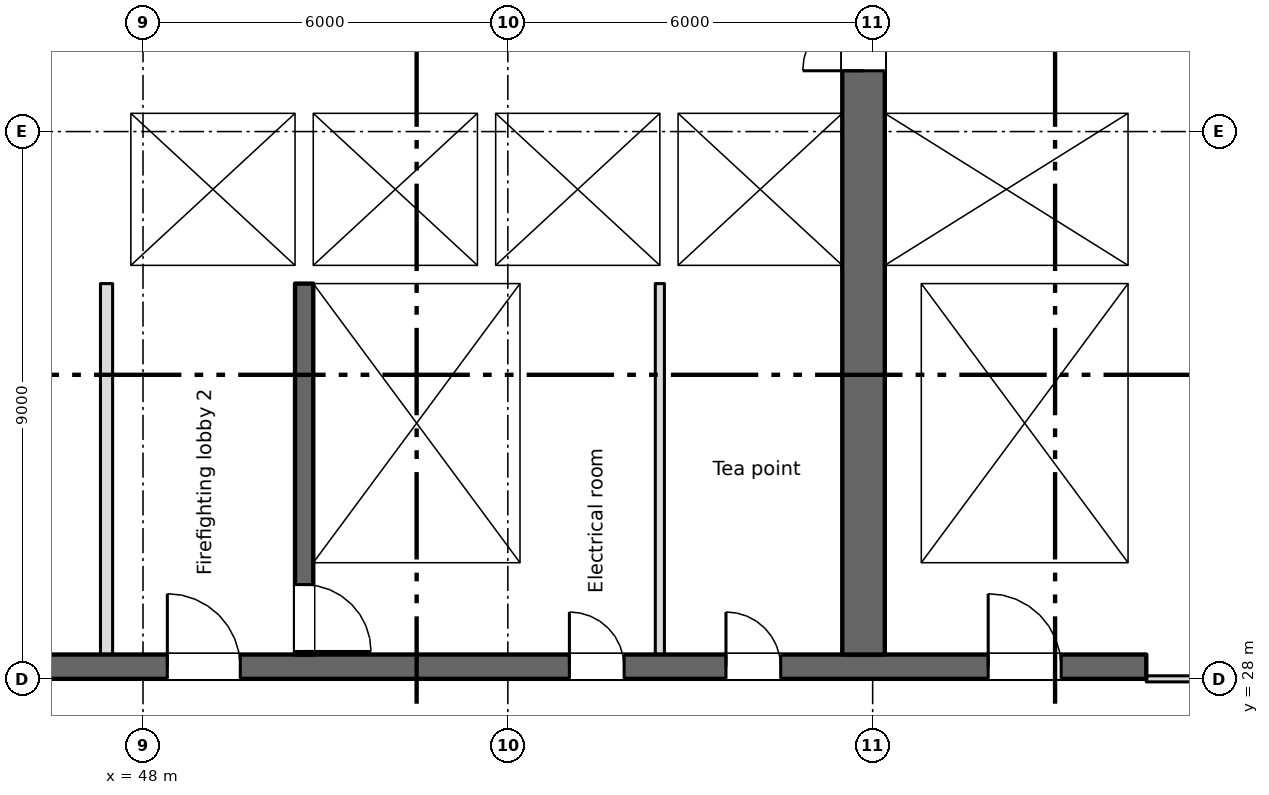
"""IFC4 building model, lengths in metres.
Left out: names, types, materials, properties, quantities, classifications, styles, units other than length and angle.
Written with IfcOpenShell. Run it as: python <this file> out.ifc"""

import sys

from ifc_helpers import new_model, si_unit, direction, frame, frame_2d, origin, place, context, subcontext, project, spatial, rectangle, extrude, element, fill, save


model = new_model("IFC4")
c1 = context("Model", 3, precision=1e-05, world=origin(), true_north=direction((0.0, 1.0)))
c2 = subcontext(c1, "Body", "Model", "MODEL_VIEW")
j1 = project(units=[si_unit("LENGTHUNIT", "METRE"), si_unit("PLANEANGLEUNIT", "RADIAN")], contexts=[c1])
p1 = place(None, origin())
s1 = spatial("IfcSite", under=j1, at=p1, CompositionType="ELEMENT")
p2 = place(p1, origin())
s2 = spatial("IfcBuilding", under=s1, at=p2, CompositionType="ELEMENT")
p3 = place(p2, frame((0.0, 0.0, 185.5)))
s3 = spatial("IfcBuildingStorey", under=s2, at=p3, CompositionType="ELEMENT", Elevation=185.5)
p4 = place(p3, frame((6.6, 28.2, 0.0), z_axis=(0.0, 0.0, 1.0), x_axis=(1.0, 0.0, 0.0)))
e1 = element("IfcWall", 1, at=p4, inside=s3, PredefinedType="SHEAR", context=c2, shape_type="SweptSolid", body=[
    extrude(rectangle(XDim=57.9, YDim=0.4, at=frame_2d((28.95, 0.0))), origin(), (0.0, 0.0, 1.0), 3.35),
])
p5 = place(p4, frame((12.913, 0.0, 0.0)))
e2 = element("IfcOpeningElement", 2, at=p5, cuts=e1, PredefinedType="OPENING", context=c2, shape_type="SweptSolid", body=[
    extrude(rectangle(XDim=0.9, YDim=2.1, at=frame_2d((0.45, 1.05))), frame((0.0, 0.21, 0.0), z_axis=(0.0, -1.0, 0.0), x_axis=(1.0, 0.0, 0.0)), (0.0, 0.0, 1.0), 0.42),
])
p6 = place(p4, frame((15.488, 0.0, 0.0)))
e3 = element("IfcOpeningElement", 3, at=p6, cuts=e1, PredefinedType="OPENING", context=c2, shape_type="SweptSolid", body=[
    extrude(rectangle(XDim=0.9, YDim=2.1, at=frame_2d((0.45, 1.05))), frame((0.0, 0.21, 0.0), z_axis=(0.0, -1.0, 0.0), x_axis=(1.0, 0.0, 0.0)), (0.0, 0.0, 1.0), 0.42),
])
p7 = place(p4, frame((48.413, 0.0, 0.0)))
e4 = element("IfcOpeningElement", 4, at=p7, cuts=e1, PredefinedType="OPENING", context=c2, shape_type="SweptSolid", body=[
    extrude(rectangle(XDim=0.9, YDim=2.1, at=frame_2d((0.45, 1.05))), frame((0.0, 0.21, 0.0), z_axis=(0.0, -1.0, 0.0), x_axis=(1.0, 0.0, 0.0)), (0.0, 0.0, 1.0), 0.42),
])
p8 = place(p4, frame((50.988, 0.0, 0.0)))
e5 = element("IfcOpeningElement", 5, at=p8, cuts=e1, PredefinedType="OPENING", context=c2, shape_type="SweptSolid", body=[
    extrude(rectangle(XDim=0.9, YDim=2.1, at=frame_2d((0.45, 1.05))), frame((0.0, 0.21, 0.0), z_axis=(0.0, -1.0, 0.0), x_axis=(1.0, 0.0, 0.0)), (0.0, 0.0, 1.0), 0.42),
])
p9 = place(p4, frame((0.663, 0.0, 0.0)))
e6 = element("IfcOpeningElement", 6, at=p9, cuts=e1, PredefinedType="OPENING", context=c2, shape_type="SweptSolid", body=[
    extrude(rectangle(XDim=0.9, YDim=2.1, at=frame_2d((0.45, 1.05))), frame((0.0, 0.21, 0.0), z_axis=(0.0, -1.0, 0.0), x_axis=(1.0, 0.0, 0.0)), (0.0, 0.0, 1.0), 0.42),
])
p10 = place(p4, frame((2.238, 0.0, 0.0)))
e7 = element("IfcOpeningElement", 7, at=p10, cuts=e1, PredefinedType="OPENING", context=c2, shape_type="SweptSolid", body=[
    extrude(rectangle(XDim=0.9, YDim=2.1, at=frame_2d((0.45, 1.05))), frame((0.0, 0.21, 0.0), z_axis=(0.0, -1.0, 0.0), x_axis=(1.0, 0.0, 0.0)), (0.0, 0.0, 1.0), 0.42),
])
p11 = place(p4, frame((4.8, 0.0, 0.0)))
e8 = element("IfcOpeningElement", 8, at=p11, cuts=e1, PredefinedType="OPENING", context=c2, shape_type="SweptSolid", body=[
    extrude(rectangle(XDim=1.2, YDim=2.1, at=frame_2d((0.6, 1.05))), frame((0.0, 0.21, 0.0), z_axis=(0.0, -1.0, 0.0), x_axis=(1.0, 0.0, 0.0)), (0.0, 0.0, 1.0), 0.42),
])
p12 = place(p4, frame((31.8, 0.0, 0.0)))
e9 = element("IfcOpeningElement", 9, at=p12, cuts=e1, PredefinedType="OPENING", context=c2, shape_type="SweptSolid", body=[
    extrude(rectangle(XDim=1.2, YDim=2.1, at=frame_2d((0.6, 1.05))), frame((0.0, 0.21, 0.0), z_axis=(0.0, -1.0, 0.0), x_axis=(1.0, 0.0, 0.0)), (0.0, 0.0, 1.0), 0.42),
])
p13 = place(p4, frame((55.3, 0.0, 0.0)))
e10 = element("IfcOpeningElement", 10, at=p13, cuts=e1, PredefinedType="OPENING", context=c2, shape_type="SweptSolid", body=[
    extrude(rectangle(XDim=1.2, YDim=2.1, at=frame_2d((0.6, 1.05))), frame((0.0, 0.21, 0.0), z_axis=(0.0, -1.0, 0.0), x_axis=(1.0, 0.0, 0.0)), (0.0, 0.0, 1.0), 0.42),
])
p14 = place(p4, frame((21.8, 0.0, 0.0)))
e11 = element("IfcOpeningElement", 11, at=p14, cuts=e1, PredefinedType="OPENING", context=c2, shape_type="SweptSolid", body=[
    extrude(rectangle(XDim=1.2, YDim=2.1, at=frame_2d((0.6, 1.05))), frame((0.0, 0.21, 0.0), z_axis=(0.0, -1.0, 0.0), x_axis=(1.0, 0.0, 0.0)), (0.0, 0.0, 1.0), 0.42),
])
p15 = place(p4, frame((41.8, 0.0, 0.0)))
e12 = element("IfcOpeningElement", 12, at=p15, cuts=e1, PredefinedType="OPENING", context=c2, shape_type="SweptSolid", body=[
    extrude(rectangle(XDim=1.2, YDim=2.1, at=frame_2d((0.6, 1.05))), frame((0.0, 0.21, 0.0), z_axis=(0.0, -1.0, 0.0), x_axis=(1.0, 0.0, 0.0)), (0.0, 0.0, 1.0), 0.42),
])
p16 = place(p4, frame((24.95, 0.0, 0.0)))
e13 = element("IfcOpeningElement", 13, at=p16, cuts=e1, PredefinedType="OPENING", context=c2, shape_type="SweptSolid", body=[
    extrude(rectangle(XDim=2.4, YDim=2.1, at=frame_2d((1.2, 1.05))), frame((0.0, 0.21, 0.0), z_axis=(0.0, -1.0, 0.0), x_axis=(1.0, 0.0, 0.0)), (0.0, 0.0, 1.0), 0.42),
])
p17 = place(p4, frame((37.45, 0.0, 0.0)))
e14 = element("IfcOpeningElement", 14, at=p17, cuts=e1, PredefinedType="OPENING", context=c2, shape_type="SweptSolid", body=[
    extrude(rectangle(XDim=2.4, YDim=2.1, at=frame_2d((1.2, 1.05))), frame((0.0, 0.21, 0.0), z_axis=(0.0, -1.0, 0.0), x_axis=(1.0, 0.0, 0.0)), (0.0, 0.0, 1.0), 0.42),
])
p18 = place(p4, frame((8.1, 0.0, 0.0)))
e15 = element("IfcOpeningElement", 15, at=p18, cuts=e1, PredefinedType="OPENING", context=c2, shape_type="SweptSolid", body=[
    extrude(rectangle(XDim=2.4, YDim=2.1, at=frame_2d((1.2, 1.05))), frame((0.0, 0.21, 0.0), z_axis=(0.0, -1.0, 0.0), x_axis=(1.0, 0.0, 0.0)), (0.0, 0.0, 1.0), 0.42),
])
p19 = place(p4, frame((28.95, 0.0, 0.0)))
e16 = element("IfcOpeningElement", 16, at=p19, cuts=e1, PredefinedType="OPENING", context=c2, shape_type="SweptSolid", body=[
    extrude(rectangle(XDim=0.9, YDim=2.1, at=frame_2d((0.45, 1.05))), frame((0.0, 0.21, 0.0), z_axis=(0.0, -1.0, 0.0), x_axis=(1.0, 0.0, 0.0)), (0.0, 0.0, 1.0), 0.42),
])
p20 = place(p4, frame((34.95, 0.0, 0.0)))
e17 = element("IfcOpeningElement", 17, at=p20, cuts=e1, PredefinedType="OPENING", context=c2, shape_type="SweptSolid", body=[
    extrude(rectangle(XDim=0.9, YDim=2.1, at=frame_2d((0.45, 1.05))), frame((0.0, 0.21, 0.0), z_axis=(0.0, -1.0, 0.0), x_axis=(1.0, 0.0, 0.0)), (0.0, 0.0, 1.0), 0.42),
])
p21 = place(p3, frame((64.35, 34.8, 0.0), z_axis=(0.0, 0.0, 1.0), x_axis=(0.0, 1.0, 0.0)))
e18 = element("IfcWall", 18, at=p21, inside=s3, PredefinedType="SHEAR", context=c2, shape_type="SweptSolid", body=[
    extrude(rectangle(XDim=10.5, YDim=0.3, at=frame_2d((5.25, 0.0))), origin(), (0.0, 0.0, 1.0), 3.35),
])
p22 = place(p3, frame((59.85, 28.4, 0.0), z_axis=(0.0, 0.0, 1.0), x_axis=(0.0, 1.0, 0.0)))
e19 = element("IfcWall", 19, at=p22, inside=s3, PredefinedType="SHEAR", context=c2, shape_type="SweptSolid", body=[
    extrude(rectangle(XDim=16.9, YDim=0.7, at=frame_2d((8.45, 0.0))), origin(), (0.0, 0.0, 1.0), 3.35),
])
p23 = place(p22, frame((9.6, 0.0, 0.0)))
e20 = element("IfcOpeningElement", 20, at=p23, cuts=e19, PredefinedType="OPENING", context=c2, shape_type="SweptSolid", body=[
    extrude(rectangle(XDim=2.0, YDim=2.1, at=frame_2d((1.0, 1.05))), frame((0.0, 0.36, 0.0), z_axis=(0.0, -1.0, 0.0), x_axis=(1.0, 0.0, 0.0)), (0.0, 0.0, 1.0), 0.72),
])
p24 = place(p22, frame((15.4, 0.0, 0.0)))
e21 = element("IfcOpeningElement", 21, at=p24, cuts=e19, PredefinedType="OPENING", context=c2, shape_type="SweptSolid", body=[
    extrude(rectangle(XDim=1.2, YDim=2.1, at=frame_2d((0.6, 1.05))), frame((0.0, 0.36, 0.0), z_axis=(0.0, -1.0, 0.0), x_axis=(1.0, 0.0, 0.0)), (0.0, 0.0, 1.0), 0.72),
])
p25 = place(p3, frame((50.65, 34.5, 0.0), z_axis=(0.0, 0.0, 1.0), x_axis=(0.0, -1.0, 0.0)))
e22 = element("IfcWall", 22, at=p25, inside=s3, PredefinedType="SHEAR", context=c2, shape_type="SweptSolid", body=[
    extrude(rectangle(XDim=6.1, YDim=0.3, at=frame_2d((3.05, 0.0))), origin(), (0.0, 0.0, 1.0), 3.35),
])
p26 = place(p25, frame((4.95, 0.0, 0.0)))
e23 = element("IfcOpeningElement", 23, at=p26, cuts=e22, PredefinedType="OPENING", context=c2, shape_type="SweptSolid", body=[
    extrude(rectangle(XDim=1.1, YDim=2.1, at=frame_2d((0.55, 1.05))), frame((0.0, 0.16, 0.0), z_axis=(0.0, -1.0, 0.0), x_axis=(1.0, 0.0, 0.0)), (0.0, 0.0, 1.0), 0.32),
])
p27 = place(p3, frame((54.35, 28.4, 0.0), z_axis=(0.0, 0.0, 1.0), x_axis=(0.0, 1.0, 0.0)))
e24 = element("IfcWall", 24, at=p27, inside=s3, PredefinedType="SHEAR", context=c2, shape_type="SweptSolid", body=[
    extrude(rectangle(XDim=6.1, YDim=0.3, at=frame_2d((3.05, 0.0))), origin(), (0.0, 0.0, 1.0), 3.35),
])
p28 = place(p3, frame((60.5, 28.4, 0.0), z_axis=(0.0, 0.0, 1.0), x_axis=(0.0, 1.0, 0.0)))
e25 = element("IfcWall", 25, at=p28, inside=s3, PredefinedType="SHEAR", context=c2, shape_type="SweptSolid", body=[
    extrude(rectangle(XDim=6.1, YDim=0.6, at=frame_2d((3.05, 0.0))), origin(), (0.0, 0.0, 1.0), 3.35),
])
p29 = place(p3, frame((64.35, 28.4, 0.0), z_axis=(0.0, 0.0, 1.0), x_axis=(0.0, 1.0, 0.0)))
e26 = element("IfcWall", 26, at=p29, inside=s3, PredefinedType="SHEAR", context=c2, shape_type="SweptSolid", body=[
    extrude(rectangle(XDim=6.1, YDim=0.3, at=frame_2d((3.05, 0.0))), origin(), (0.0, 0.0, 1.0), 3.35),
])
p30 = place(p3, frame((47.3, 34.65, 0.0), z_axis=(0.0, 0.0, 1.0), x_axis=(1.0, 0.0, 0.0)))
e27 = element("IfcWall", 27, at=p30, inside=s3, PredefinedType="SHEAR", context=c2, shape_type="SweptSolid", body=[
    extrude(rectangle(XDim=12.2, YDim=0.3, at=frame_2d((6.1, 0.0))), origin(), (0.0, 0.0, 1.0), 3.35),
])
p31 = place(p30, frame((1.3, 0.0, 0.0)))
e28 = element("IfcOpeningElement", 28, at=p31, cuts=e27, PredefinedType="OPENING", context=c2, shape_type="SweptSolid", body=[
    extrude(rectangle(XDim=1.1, YDim=2.1, at=frame_2d((0.55, 1.05))), frame((0.0, 0.16, 0.0), z_axis=(0.0, -1.0, 0.0), x_axis=(1.0, 0.0, 0.0)), (0.0, 0.0, 1.0), 0.32),
])
p32 = place(p3, frame((60.2, 34.65, 0.0), z_axis=(0.0, 0.0, 1.0), x_axis=(1.0, 0.0, 0.0)))
e29 = element("IfcWall", 29, at=p32, inside=s3, PredefinedType="SHEAR", context=c2, shape_type="SweptSolid", body=[
    extrude(rectangle(XDim=4.3, YDim=0.3, at=frame_2d((2.15, 0.0))), origin(), (0.0, 0.0, 1.0), 3.35),
])
p33 = place(p3, frame((47.3, 37.45, 0.0), z_axis=(0.0, 0.0, 1.0), x_axis=(1.0, 0.0, 0.0)))
e30 = element("IfcWall", 30, at=p33, inside=s3, PredefinedType="SHEAR", context=c2, shape_type="SweptSolid", body=[
    extrude(rectangle(XDim=12.2, YDim=0.3, at=frame_2d((6.1, 0.0))), origin(), (0.0, 0.0, 1.0), 3.35),
])
p34 = place(p33, frame((4.3, 0.0, 0.0)))
e31 = element("IfcOpeningElement", 31, at=p34, cuts=e30, PredefinedType="OPENING", context=c2, shape_type="SweptSolid", body=[
    extrude(rectangle(XDim=1.1, YDim=2.1, at=frame_2d((0.55, 1.05))), frame((0.0, 0.16, 0.0), z_axis=(0.0, -1.0, 0.0), x_axis=(1.0, 0.0, 0.0)), (0.0, 0.0, 1.0), 0.32),
])
p35 = place(p33, frame((7.3, 0.0, 0.0)))
e32 = element("IfcOpeningElement", 32, at=p35, cuts=e30, PredefinedType="OPENING", context=c2, shape_type="SweptSolid", body=[
    extrude(rectangle(XDim=1.1, YDim=2.1, at=frame_2d((0.55, 1.05))), frame((0.0, 0.16, 0.0), z_axis=(0.0, -1.0, 0.0), x_axis=(1.0, 0.0, 0.0)), (0.0, 0.0, 1.0), 0.32),
])
p36 = place(p33, frame((10.3, 0.0, 0.0)))
e33 = element("IfcOpeningElement", 33, at=p36, cuts=e30, PredefinedType="OPENING", context=c2, shape_type="SweptSolid", body=[
    extrude(rectangle(XDim=1.1, YDim=2.1, at=frame_2d((0.55, 1.05))), frame((0.0, 0.16, 0.0), z_axis=(0.0, -1.0, 0.0), x_axis=(1.0, 0.0, 0.0)), (0.0, 0.0, 1.0), 0.32),
])
p37 = place(p3, frame((60.2, 37.45, 0.0), z_axis=(0.0, 0.0, 1.0), x_axis=(1.0, 0.0, 0.0)))
e34 = element("IfcWall", 34, at=p37, inside=s3, PredefinedType="SHEAR", context=c2, shape_type="SweptSolid", body=[
    extrude(rectangle(XDim=4.0, YDim=0.3, at=frame_2d((2.0, 0.0))), origin(), (0.0, 0.0, 1.0), 3.35),
])
p38 = place(p37, frame((1.45, 0.0, 0.0)))
e35 = element("IfcOpeningElement", 35, at=p38, cuts=e34, PredefinedType="OPENING", context=c2, shape_type="SweptSolid", body=[
    extrude(rectangle(XDim=1.1, YDim=2.1, at=frame_2d((0.55, 1.05))), frame((0.0, 0.16, 0.0), z_axis=(0.0, -1.0, 0.0), x_axis=(1.0, 0.0, 0.0)), (0.0, 0.0, 1.0), 0.32),
])
p39 = place(p3, frame((47.55, 34.8, 0.0), z_axis=(0.0, 0.0, 1.0), x_axis=(0.0, 1.0, 0.0)))
e36 = element("IfcWall", 36, at=p39, inside=s3, PredefinedType="SHEAR", context=c2, shape_type="SweptSolid", body=[
    extrude(rectangle(XDim=2.5, YDim=0.5, at=frame_2d((1.25, 0.0))), origin(), (0.0, 0.0, 1.0), 3.35),
])
for number, where, z_axis, x_axis in (
    (37, (50.65, 34.8, 0.0), (0.0, 0.0, 1.0), (0.0, 1.0, 0.0)),
    (38, (53.65, 34.8, 0.0), (0.0, 0.0, 1.0), (0.0, 1.0, 0.0)),
    (39, (56.65, 34.8, 0.0), (0.0, 0.0, 1.0), (0.0, 1.0, 0.0)),
):
    element("IfcWall", number, at=place(p3, frame(where, z_axis=z_axis, x_axis=x_axis)), inside=s3, PredefinedType="SHEAR", context=c2, shape_type="SweptSolid", body=[
        extrude(rectangle(XDim=2.5, YDim=0.3, at=frame_2d((1.25, 0.0))), origin(), (0.0, 0.0, 1.0), 3.35),
    ])
p40 = place(p3, frame((47.4, 28.4, 0.0), z_axis=(0.0, 0.0, 1.0), x_axis=(0.0, 1.0, 0.0)))
e40 = element("IfcWall", 40, at=p40, inside=s3, PredefinedType="PARTITIONING", context=c2, shape_type="SweptSolid", body=[
    extrude(rectangle(XDim=6.1, YDim=0.2, at=frame_2d((3.05, 0.0))), origin(), (0.0, 0.0, 1.0), 3.35),
])
p41 = place(p3, frame((56.5, 28.4, 0.0), z_axis=(0.0, 0.0, 1.0), x_axis=(0.0, 1.0, 0.0)))
e41 = element("IfcWall", 41, at=p41, inside=s3, PredefinedType="PARTITIONING", context=c2, shape_type="SweptSolid", body=[
    extrude(rectangle(XDim=6.1, YDim=0.15, at=frame_2d((3.05, 0.0))), origin(), (0.0, 0.0, 1.0), 3.35),
])
p42 = place(p3, frame((64.5, 28.0, 0.0), z_axis=(0.0, 0.0, 1.0), x_axis=(1.0, 0.0, 0.0)))
e42 = element("IfcWall", 42, at=p42, inside=s3, PredefinedType="PARTITIONING", context=c2, shape_type="SweptSolid", body=[
    extrude(rectangle(XDim=6.9, YDim=0.1, at=frame_2d((3.45, 0.0))), origin(), (0.0, 0.0, 1.0), 3.35),
])
p43 = place(p42, frame((2.55, 0.0, 0.0)))
e43 = element("IfcOpeningElement", 43, at=p43, cuts=e42, PredefinedType="OPENING", context=c2, shape_type="SweptSolid", body=[
    extrude(rectangle(XDim=1.8, YDim=2.1, at=frame_2d((0.9, 1.05))), frame((0.0, 0.06, 0.0), z_axis=(0.0, -1.0, 0.0), x_axis=(1.0, 0.0, 0.0)), (0.0, 0.0, 1.0), 0.12),
])
p44 = place(p7, origin())
e44 = element("IfcDoor", 44, at=p44, inside=s3, OperationType="SINGLE_SWING_LEFT", PredefinedType="DOOR", context=c2, shape_type="SweptSolid", body=[
    extrude(rectangle(XDim=0.9, YDim=2.1, at=frame_2d((0.45, 1.05))), frame((0.0, 0.025, 0.0), z_axis=(0.0, -1.0, 0.0), x_axis=(1.0, 0.0, 0.0)), (0.0, 0.0, 1.0), 0.05),
])
fill(e4, e44)
p45 = place(p8, origin())
e45 = element("IfcDoor", 45, at=p45, inside=s3, OperationType="SINGLE_SWING_LEFT", PredefinedType="DOOR", context=c2, shape_type="SweptSolid", body=[
    extrude(rectangle(XDim=0.9, YDim=2.1, at=frame_2d((0.45, 1.05))), frame((0.0, 0.025, 0.0), z_axis=(0.0, -1.0, 0.0), x_axis=(1.0, 0.0, 0.0)), (0.0, 0.0, 1.0), 0.05),
])
fill(e5, e45)
p46 = place(p34, origin())
e46 = element("IfcDoor", 46, at=p46, inside=s3, OperationType="SLIDING_TO_LEFT", PredefinedType="DOOR", context=c2, shape_type="SweptSolid", body=[
    extrude(rectangle(XDim=1.1, YDim=2.1, at=frame_2d((0.55, 1.05))), frame((0.0, 0.025, 0.0), z_axis=(0.0, -1.0, 0.0), x_axis=(1.0, 0.0, 0.0)), (0.0, 0.0, 1.0), 0.05),
])
fill(e31, e46)
p47 = place(p35, origin())
e47 = element("IfcDoor", 47, at=p47, inside=s3, OperationType="SLIDING_TO_LEFT", PredefinedType="DOOR", context=c2, shape_type="SweptSolid", body=[
    extrude(rectangle(XDim=1.1, YDim=2.1, at=frame_2d((0.55, 1.05))), frame((0.0, 0.025, 0.0), z_axis=(0.0, -1.0, 0.0), x_axis=(1.0, 0.0, 0.0)), (0.0, 0.0, 1.0), 0.05),
])
fill(e32, e47)
p48 = place(p36, origin())
e48 = element("IfcDoor", 48, at=p48, inside=s3, OperationType="SLIDING_TO_LEFT", PredefinedType="DOOR", context=c2, shape_type="SweptSolid", body=[
    extrude(rectangle(XDim=1.1, YDim=2.1, at=frame_2d((0.55, 1.05))), frame((0.0, 0.025, 0.0), z_axis=(0.0, -1.0, 0.0), x_axis=(1.0, 0.0, 0.0)), (0.0, 0.0, 1.0), 0.05),
])
fill(e33, e48)
p49 = place(p38, origin())
e49 = element("IfcDoor", 49, at=p49, inside=s3, OperationType="SLIDING_TO_LEFT", PredefinedType="DOOR", context=c2, shape_type="SweptSolid", body=[
    extrude(rectangle(XDim=1.1, YDim=2.1, at=frame_2d((0.55, 1.05))), frame((0.0, 0.025, 0.0), z_axis=(0.0, -1.0, 0.0), x_axis=(1.0, 0.0, 0.0)), (0.0, 0.0, 1.0), 0.05),
])
fill(e35, e49)
p50 = place(p31, origin())
e50 = element("IfcDoor", 50, at=p50, inside=s3, OperationType="SLIDING_TO_LEFT", PredefinedType="DOOR", context=c2, shape_type="SweptSolid", body=[
    extrude(rectangle(XDim=1.1, YDim=2.1, at=frame_2d((0.55, 1.05))), frame((0.0, 0.025, 0.0), z_axis=(0.0, -1.0, 0.0), x_axis=(1.0, 0.0, 0.0)), (0.0, 0.0, 1.0), 0.05),
])
fill(e28, e50)
p51 = place(p26, origin())
e51 = element("IfcDoor", 51, at=p51, inside=s3, OperationType="SINGLE_SWING_RIGHT", PredefinedType="DOOR", context=c2, shape_type="SweptSolid", body=[
    extrude(rectangle(XDim=1.1, YDim=2.1, at=frame_2d((0.55, 1.05))), frame((0.0, 0.025, 0.0), z_axis=(0.0, -1.0, 0.0), x_axis=(1.0, 0.0, 0.0)), (0.0, 0.0, 1.0), 0.05),
])
fill(e23, e51)
p52 = place(p13, origin())
e52 = element("IfcDoor", 52, at=p52, inside=s3, OperationType="SINGLE_SWING_LEFT", PredefinedType="DOOR", context=c2, shape_type="SweptSolid", body=[
    extrude(rectangle(XDim=1.2, YDim=2.1, at=frame_2d((0.6, 1.05))), frame((0.0, 0.025, 0.0), z_axis=(0.0, -1.0, 0.0), x_axis=(1.0, 0.0, 0.0)), (0.0, 0.0, 1.0), 0.05),
])
fill(e10, e52)
p53 = place(p15, origin())
e53 = element("IfcDoor", 53, at=p53, inside=s3, OperationType="SINGLE_SWING_LEFT", PredefinedType="DOOR", context=c2, shape_type="SweptSolid", body=[
    extrude(rectangle(XDim=1.2, YDim=2.1, at=frame_2d((0.6, 1.05))), frame((0.0, 0.025, 0.0), z_axis=(0.0, -1.0, 0.0), x_axis=(1.0, 0.0, 0.0)), (0.0, 0.0, 1.0), 0.05),
])
fill(e12, e53)
p54 = place(p23, origin())
e54 = element("IfcDoor", 54, at=p54, inside=s3, OperationType="DOUBLE_DOOR_SINGLE_SWING", PredefinedType="DOOR", context=c2, shape_type="SweptSolid", body=[
    extrude(rectangle(XDim=2.0, YDim=2.1, at=frame_2d((1.0, 1.05))), frame((0.0, 0.025, 0.0), z_axis=(0.0, -1.0, 0.0), x_axis=(1.0, 0.0, 0.0)), (0.0, 0.0, 1.0), 0.05),
])
fill(e20, e54)
save(model, sys.argv[1])
